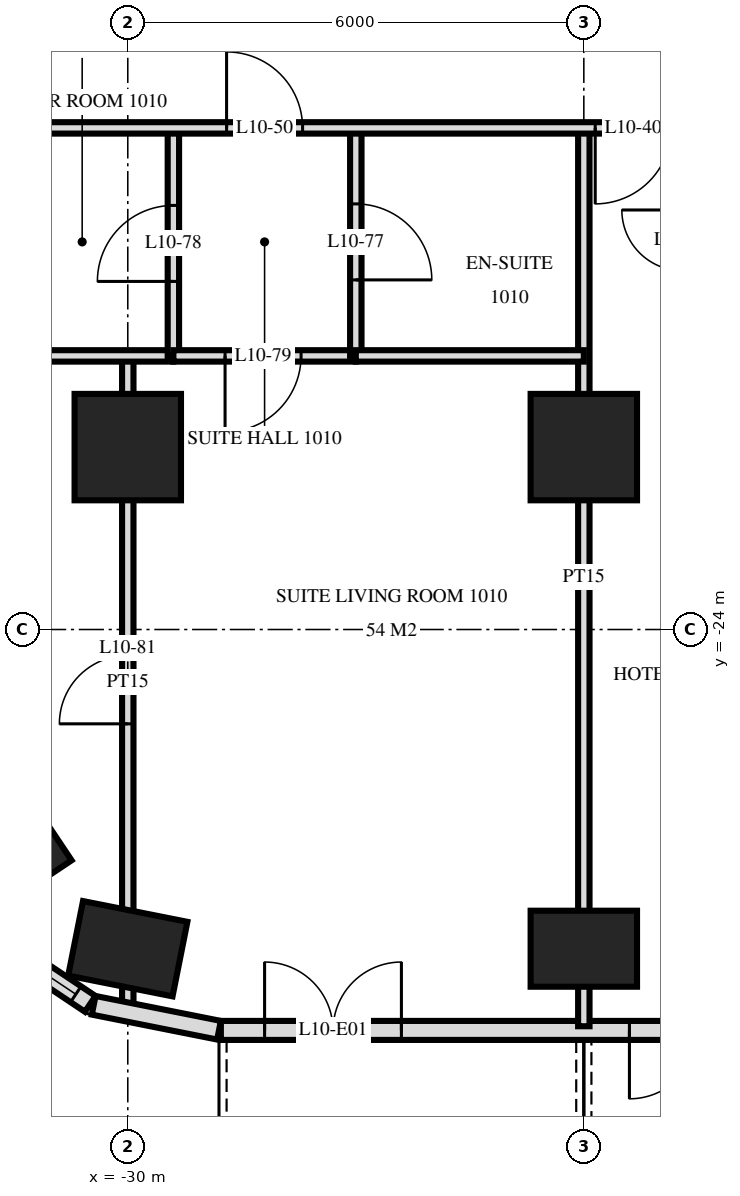
"""IFC4 building model, lengths in metres.
Left out: names, types, materials, properties, quantities, classifications, styles, units other than length and angle.
Written with IfcOpenShell. Run it as: python <this file> out.ifc"""

import sys

from ifc_helpers import new_model, si_unit, direction, frame, frame_2d, origin, origin_2d, place, context, subcontext, project, spatial, rectangle, extrude, element, fill, save


model = new_model("IFC4")
c1 = context("Model", 3, precision=1e-05, world=origin(), true_north=direction((0.0, 1.0)))
c2 = subcontext(c1, "Body", "Model", "MODEL_VIEW")
j1 = project(units=[si_unit("LENGTHUNIT", "METRE"), si_unit("PLANEANGLEUNIT", "RADIAN")], contexts=[c1])
p1 = place(None, origin())
s1 = spatial("IfcSite", under=j1, at=p1, CompositionType="ELEMENT")
p2 = place(p1, origin())
s2 = spatial("IfcBuilding", under=s1, at=p2, CompositionType="ELEMENT")
p3 = place(p2, frame((0.0, 0.0, 45.6)))
s3 = spatial("IfcBuildingStorey", under=s2, at=p3, CompositionType="ELEMENT", Elevation=45.6)
for number, where, z_axis, x_axis in (
    (1, (-31.544, -26.733, 0.0), (0.0, 0.0, 1.0), (-0.556, 0.831, 0.0)),
    (2, (-30.0, -28.2, 0.0), (0.0, 0.0, 1.0), (-0.981, 0.195, 0.0)),
):
    element("IfcColumn", number, at=place(p3, frame(where, z_axis=z_axis, x_axis=x_axis)), inside=s3, PredefinedType="COLUMN", context=c2, shape_type="SweptSolid", body=[
        extrude(rectangle(XDim=1.4, YDim=1.0, at=origin_2d()), origin(), (0.0, 0.0, 1.0), 3.6),
    ])
p4 = place(p3, frame((-30.0, -21.6, 0.0), z_axis=(0.0, 0.0, 1.0), x_axis=(1.0, 0.0, 0.0)))
e3 = element("IfcColumn", 3, at=p4, inside=s3, PredefinedType="COLUMN", context=c2, shape_type="SweptSolid", body=[
    extrude(rectangle(XDim=1.4, YDim=1.4, at=origin_2d()), origin(), (0.0, 0.0, 1.0), 3.6),
])
p5 = place(p3, frame((-24.0, -28.2, 0.0), z_axis=(0.0, 0.0, 1.0), x_axis=(1.0, 0.0, 0.0)))
e4 = element("IfcColumn", 4, at=p5, inside=s3, PredefinedType="COLUMN", context=c2, shape_type="SweptSolid", body=[
    extrude(rectangle(XDim=1.4, YDim=1.0, at=origin_2d()), origin(), (0.0, 0.0, 1.0), 3.6),
])
p6 = place(p3, frame((-24.0, -21.6, 0.0), z_axis=(0.0, 0.0, 1.0), x_axis=(1.0, 0.0, 0.0)))
e5 = element("IfcColumn", 5, at=p6, inside=s3, PredefinedType="COLUMN", context=c2, shape_type="SweptSolid", body=[
    extrude(rectangle(XDim=1.4, YDim=1.4, at=origin_2d()), origin(), (0.0, 0.0, 1.0), 3.6),
])
p7 = place(p3, frame((-31.871, -28.006, 0.0), z_axis=(0.0, 0.0, 1.0), x_axis=(0.831482937015, -0.55555029066, 0.0)))
e6 = element("IfcWall", 6, at=p7, inside=s3, PredefinedType="SOLIDWALL", context=c2, shape_type="SweptSolid", body=[
    extrude(rectangle(XDim=1.656, YDim=0.25, at=frame_2d((0.828, 0.0))), origin(), (0.0, 0.0, 1.0), 3.32),
])
p8 = place(p7, frame((0.228, 0.0, 0.9)))
e7 = element("IfcOpeningElement", 7, at=p8, cuts=e6, PredefinedType="OPENING", context=c2, shape_type="SweptSolid", body=[
    extrude(rectangle(XDim=1.2, YDim=1.5, at=frame_2d((0.6, 0.75))), frame((0.0, 0.135, 0.0), z_axis=(0.0, -1.0, 0.0), x_axis=(1.0, 0.0, 0.0)), (0.0, 0.0, 1.0), 0.27),
])
p9 = place(p3, frame((-30.449, -28.945, 0.0), z_axis=(0.0, 0.0, 1.0), x_axis=(0.980775640221, -0.19513878023, 0.0)))
e8 = element("IfcWall", 8, at=p9, inside=s3, PredefinedType="SOLIDWALL", context=c2, shape_type="SweptSolid", body=[
    extrude(rectangle(XDim=1.681, YDim=0.25, at=frame_2d((0.841, 0.0))), origin(), (0.0, 0.0, 1.0), 3.32),
])
p10 = place(p3, frame((-28.775, -29.275, 0.0), z_axis=(0.0, 0.0, 1.0), x_axis=(1.0, 0.0, 0.0)))
e9 = element("IfcWall", 9, at=p10, inside=s3, PredefinedType="SOLIDWALL", context=c2, shape_type="SweptSolid", body=[
    extrude(rectangle(XDim=57.551, YDim=0.25, at=frame_2d((28.775, 0.0))), origin(), (0.0, 0.0, 1.0), 3.32),
])
p11 = place(p10, frame((0.575, 0.0, 0.0)))
e10 = element("IfcOpeningElement", 10, at=p11, cuts=e9, PredefinedType="OPENING", context=c2, shape_type="SweptSolid", body=[
    extrude(rectangle(XDim=1.8, YDim=2.4, at=frame_2d((0.9, 1.2))), frame((0.0, 0.135, 0.0), z_axis=(0.0, -1.0, 0.0), x_axis=(1.0, 0.0, 0.0)), (0.0, 0.0, 1.0), 0.27),
])
p12 = place(p10, frame((5.375, 0.0, 0.0)))
e11 = element("IfcOpeningElement", 11, at=p12, cuts=e9, PredefinedType="OPENING", context=c2, shape_type="SweptSolid", body=[
    extrude(rectangle(XDim=1.8, YDim=2.4, at=frame_2d((0.9, 1.2))), frame((0.0, 0.135, 0.0), z_axis=(0.0, -1.0, 0.0), x_axis=(1.0, 0.0, 0.0)), (0.0, 0.0, 1.0), 0.27),
])
p13 = place(p10, frame((8.075, 0.0, 0.3)))
e12 = element("IfcOpeningElement", 12, at=p13, cuts=e9, PredefinedType="OPENING", context=c2, shape_type="SweptSolid", body=[
    extrude(rectangle(XDim=2.4, YDim=2.1, at=frame_2d((1.2, 1.05))), frame((0.0, 0.135, 0.0), z_axis=(0.0, -1.0, 0.0), x_axis=(1.0, 0.0, 0.0)), (0.0, 0.0, 1.0), 0.27),
])
p14 = place(p10, frame((12.875, 0.0, 0.0)))
e13 = element("IfcOpeningElement", 13, at=p14, cuts=e9, PredefinedType="OPENING", context=c2, shape_type="SweptSolid", body=[
    extrude(rectangle(XDim=1.8, YDim=2.4, at=frame_2d((0.9, 1.2))), frame((0.0, 0.135, 0.0), z_axis=(0.0, -1.0, 0.0), x_axis=(1.0, 0.0, 0.0)), (0.0, 0.0, 1.0), 0.27),
])
p15 = place(p10, frame((17.375, 0.0, 0.0)))
e14 = element("IfcOpeningElement", 14, at=p15, cuts=e9, PredefinedType="OPENING", context=c2, shape_type="SweptSolid", body=[
    extrude(rectangle(XDim=1.8, YDim=2.4, at=frame_2d((0.9, 1.2))), frame((0.0, 0.135, 0.0), z_axis=(0.0, -1.0, 0.0), x_axis=(1.0, 0.0, 0.0)), (0.0, 0.0, 1.0), 0.27),
])
p16 = place(p10, frame((20.075, 0.0, 0.3)))
e15 = element("IfcOpeningElement", 15, at=p16, cuts=e9, PredefinedType="OPENING", context=c2, shape_type="SweptSolid", body=[
    extrude(rectangle(XDim=2.4, YDim=2.1, at=frame_2d((1.2, 1.05))), frame((0.0, 0.135, 0.0), z_axis=(0.0, -1.0, 0.0), x_axis=(1.0, 0.0, 0.0)), (0.0, 0.0, 1.0), 0.27),
])
p17 = place(p10, frame((23.075, 0.0, 0.3)))
e16 = element("IfcOpeningElement", 16, at=p17, cuts=e9, PredefinedType="OPENING", context=c2, shape_type="SweptSolid", body=[
    extrude(rectangle(XDim=2.4, YDim=2.1, at=frame_2d((1.2, 1.05))), frame((0.0, 0.135, 0.0), z_axis=(0.0, -1.0, 0.0), x_axis=(1.0, 0.0, 0.0)), (0.0, 0.0, 1.0), 0.27),
])
p18 = place(p10, frame((26.375, 0.0, 0.0)))
e17 = element("IfcOpeningElement", 17, at=p18, cuts=e9, PredefinedType="OPENING", context=c2, shape_type="SweptSolid", body=[
    extrude(rectangle(XDim=1.8, YDim=2.4, at=frame_2d((0.9, 1.2))), frame((0.0, 0.135, 0.0), z_axis=(0.0, -1.0, 0.0), x_axis=(1.0, 0.0, 0.0)), (0.0, 0.0, 1.0), 0.27),
])
p19 = place(p10, frame((29.075, 0.0, 0.3)))
e18 = element("IfcOpeningElement", 18, at=p19, cuts=e9, PredefinedType="OPENING", context=c2, shape_type="SweptSolid", body=[
    extrude(rectangle(XDim=2.4, YDim=2.1, at=frame_2d((1.2, 1.05))), frame((0.0, 0.135, 0.0), z_axis=(0.0, -1.0, 0.0), x_axis=(1.0, 0.0, 0.0)), (0.0, 0.0, 1.0), 0.27),
])
p20 = place(p10, frame((32.375, 0.0, 0.0)))
e19 = element("IfcOpeningElement", 19, at=p20, cuts=e9, PredefinedType="OPENING", context=c2, shape_type="SweptSolid", body=[
    extrude(rectangle(XDim=1.8, YDim=2.4, at=frame_2d((0.9, 1.2))), frame((0.0, 0.135, 0.0), z_axis=(0.0, -1.0, 0.0), x_axis=(1.0, 0.0, 0.0)), (0.0, 0.0, 1.0), 0.27),
])
p21 = place(p10, frame((35.375, 0.0, 0.0)))
e20 = element("IfcOpeningElement", 20, at=p21, cuts=e9, PredefinedType="OPENING", context=c2, shape_type="SweptSolid", body=[
    extrude(rectangle(XDim=1.8, YDim=2.4, at=frame_2d((0.9, 1.2))), frame((0.0, 0.135, 0.0), z_axis=(0.0, -1.0, 0.0), x_axis=(1.0, 0.0, 0.0)), (0.0, 0.0, 1.0), 0.27),
])
p22 = place(p10, frame((38.075, 0.0, 0.3)))
e21 = element("IfcOpeningElement", 21, at=p22, cuts=e9, PredefinedType="OPENING", context=c2, shape_type="SweptSolid", body=[
    extrude(rectangle(XDim=2.4, YDim=2.1, at=frame_2d((1.2, 1.05))), frame((0.0, 0.135, 0.0), z_axis=(0.0, -1.0, 0.0), x_axis=(1.0, 0.0, 0.0)), (0.0, 0.0, 1.0), 0.27),
])
p23 = place(p10, frame((41.075, 0.0, 0.3)))
e22 = element("IfcOpeningElement", 22, at=p23, cuts=e9, PredefinedType="OPENING", context=c2, shape_type="SweptSolid", body=[
    extrude(rectangle(XDim=2.4, YDim=2.1, at=frame_2d((1.2, 1.05))), frame((0.0, 0.135, 0.0), z_axis=(0.0, -1.0, 0.0), x_axis=(1.0, 0.0, 0.0)), (0.0, 0.0, 1.0), 0.27),
])
p24 = place(p10, frame((44.375, 0.0, 0.0)))
e23 = element("IfcOpeningElement", 23, at=p24, cuts=e9, PredefinedType="OPENING", context=c2, shape_type="SweptSolid", body=[
    extrude(rectangle(XDim=1.8, YDim=2.4, at=frame_2d((0.9, 1.2))), frame((0.0, 0.135, 0.0), z_axis=(0.0, -1.0, 0.0), x_axis=(1.0, 0.0, 0.0)), (0.0, 0.0, 1.0), 0.27),
])
p25 = place(p10, frame((47.075, 0.0, 0.3)))
e24 = element("IfcOpeningElement", 24, at=p25, cuts=e9, PredefinedType="OPENING", context=c2, shape_type="SweptSolid", body=[
    extrude(rectangle(XDim=2.4, YDim=2.1, at=frame_2d((1.2, 1.05))), frame((0.0, 0.135, 0.0), z_axis=(0.0, -1.0, 0.0), x_axis=(1.0, 0.0, 0.0)), (0.0, 0.0, 1.0), 0.27),
])
p26 = place(p10, frame((50.375, 0.0, 0.0)))
e25 = element("IfcOpeningElement", 25, at=p26, cuts=e9, PredefinedType="OPENING", context=c2, shape_type="SweptSolid", body=[
    extrude(rectangle(XDim=1.8, YDim=2.4, at=frame_2d((0.9, 1.2))), frame((0.0, 0.135, 0.0), z_axis=(0.0, -1.0, 0.0), x_axis=(1.0, 0.0, 0.0)), (0.0, 0.0, 1.0), 0.27),
])
p27 = place(p10, frame((53.375, 0.0, 0.0)))
e26 = element("IfcOpeningElement", 26, at=p27, cuts=e9, PredefinedType="OPENING", context=c2, shape_type="SweptSolid", body=[
    extrude(rectangle(XDim=1.8, YDim=2.4, at=frame_2d((0.9, 1.2))), frame((0.0, 0.135, 0.0), z_axis=(0.0, -1.0, 0.0), x_axis=(1.0, 0.0, 0.0)), (0.0, 0.0, 1.0), 0.27),
])
p28 = place(p3, frame((-24.0, -29.22, 0.0), z_axis=(0.0, 0.0, 1.0), x_axis=(0.0, 1.0, 0.0)))
e27 = element("IfcWall", 27, at=p28, inside=s3, PredefinedType="PARTITIONING", context=c2, shape_type="SweptSolid", body=[
    extrude(rectangle(XDim=11.82, YDim=0.15, at=frame_2d((5.91, 0.0))), origin(), (0.0, 0.0, 1.0), 3.32),
])
p29 = place(p3, frame((-27.0, -20.4, 0.0), z_axis=(0.0, 0.0, 1.0), x_axis=(0.0, 1.0, 0.0)))
e28 = element("IfcWall", 28, at=p29, inside=s3, PredefinedType="PARTITIONING", context=c2, shape_type="SweptSolid", body=[
    extrude(rectangle(XDim=3.0, YDim=0.15, at=frame_2d((1.5, 0.0))), origin(), (0.0, 0.0, 1.0), 3.32),
])
p30 = place(p29, frame((1.0, 0.0, 0.0)))
e29 = element("IfcOpeningElement", 29, at=p30, cuts=e28, PredefinedType="OPENING", context=c2, shape_type="SweptSolid", body=[
    extrude(rectangle(XDim=1.0, YDim=2.1, at=frame_2d((0.5, 1.05))), frame((0.0, 0.085, 0.0), z_axis=(0.0, -1.0, 0.0), x_axis=(1.0, 0.0, 0.0)), (0.0, 0.0, 1.0), 0.17),
])
p31 = place(p3, frame((-29.4, -20.4, 0.0), z_axis=(0.0, 0.0, 1.0), x_axis=(0.0, 1.0, 0.0)))
e30 = element("IfcWall", 30, at=p31, inside=s3, PredefinedType="PARTITIONING", context=c2, shape_type="SweptSolid", body=[
    extrude(rectangle(XDim=3.0, YDim=0.15, at=frame_2d((1.5, 0.0))), origin(), (0.0, 0.0, 1.0), 3.32),
])
p32 = place(p31, frame((0.98, 0.0, 0.0)))
e31 = element("IfcOpeningElement", 31, at=p32, cuts=e30, PredefinedType="OPENING", context=c2, shape_type="SweptSolid", body=[
    extrude(rectangle(XDim=1.0, YDim=2.1, at=frame_2d((0.5, 1.05))), frame((0.0, 0.085, 0.0), z_axis=(0.0, -1.0, 0.0), x_axis=(1.0, 0.0, 0.0)), (0.0, 0.0, 1.0), 0.17),
])
p33 = place(p3, frame((-30.0, -28.978, 0.0), z_axis=(0.0, 0.0, 1.0), x_axis=(0.0, 1.0, 0.0)))
e32 = element("IfcWall", 32, at=p33, inside=s3, PredefinedType="PARTITIONING", context=c2, shape_type="SweptSolid", body=[
    extrude(rectangle(XDim=8.578, YDim=0.15, at=frame_2d((4.289, 0.0))), origin(), (0.0, 0.0, 1.0), 3.32),
])
p34 = place(p33, frame((3.737, 0.0, 0.0)))
e33 = element("IfcOpeningElement", 33, at=p34, cuts=e32, PredefinedType="OPENING", context=c2, shape_type="SweptSolid", body=[
    extrude(rectangle(XDim=0.9, YDim=2.1, at=frame_2d((0.45, 1.05))), frame((0.0, 0.085, 0.0), z_axis=(0.0, -1.0, 0.0), x_axis=(1.0, 0.0, 0.0)), (0.0, 0.0, 1.0), 0.17),
])
p35 = place(p3, frame((-29.4, -20.4, 0.0), z_axis=(0.0, 0.0, 1.0), x_axis=(1.0, 0.0, 0.0)))
e34 = element("IfcWall", 34, at=p35, inside=s3, PredefinedType="PARTITIONING", context=c2, shape_type="SweptSolid", body=[
    extrude(rectangle(XDim=2.4, YDim=0.15, at=frame_2d((1.2, 0.0))), origin(), (0.0, 0.0, 1.0), 3.32),
])
p36 = place(p35, frame((0.68, 0.0, 0.0)))
e35 = element("IfcOpeningElement", 35, at=p36, cuts=e34, PredefinedType="OPENING", context=c2, shape_type="SweptSolid", body=[
    extrude(rectangle(XDim=1.0, YDim=2.1, at=frame_2d((0.5, 1.05))), frame((0.0, 0.085, 0.0), z_axis=(0.0, -1.0, 0.0), x_axis=(1.0, 0.0, 0.0)), (0.0, 0.0, 1.0), 0.17),
])
p37 = place(p3, frame((-31.8, -20.4, 0.0), z_axis=(0.0, 0.0, 1.0), x_axis=(1.0, 0.0, 0.0)))
e36 = element("IfcWall", 36, at=p37, inside=s3, PredefinedType="PARTITIONING", context=c2, shape_type="SweptSolid", body=[
    extrude(rectangle(XDim=2.4, YDim=0.15, at=frame_2d((1.2, 0.0))), origin(), (0.0, 0.0, 1.0), 3.32),
])
p38 = place(p3, frame((-27.0, -20.4, 0.0), z_axis=(0.0, 0.0, 1.0), x_axis=(1.0, 0.0, 0.0)))
e37 = element("IfcWall", 37, at=p38, inside=s3, PredefinedType="PARTITIONING", context=c2, shape_type="SweptSolid", body=[
    extrude(rectangle(XDim=3.0, YDim=0.15, at=frame_2d((1.5, 0.0))), origin(), (0.0, 0.0, 1.0), 3.32),
])
p39 = place(p3, frame((-33.12, -17.4, 0.0), z_axis=(0.0, 0.0, 1.0), x_axis=(1.0, 0.0, 0.0)))
e38 = element("IfcWall", 38, at=p39, inside=s3, PredefinedType="PARTITIONING", context=c2, shape_type="SweptSolid", body=[
    extrude(rectangle(XDim=66.24, YDim=0.15, at=frame_2d((33.12, 0.0))), origin(), (0.0, 0.0, 1.0), 3.32),
])
p40 = place(p39, frame((9.27, 0.0, 0.0)))
e39 = element("IfcOpeningElement", 39, at=p40, cuts=e38, PredefinedType="OPENING", context=c2, shape_type="SweptSolid", body=[
    extrude(rectangle(XDim=1.0, YDim=2.1, at=frame_2d((0.5, 1.05))), frame((0.0, 0.085, 0.0), z_axis=(0.0, -1.0, 0.0), x_axis=(1.0, 0.0, 0.0)), (0.0, 0.0, 1.0), 0.17),
])
p41 = place(p39, frame((13.97, 0.0, 0.0)))
e40 = element("IfcOpeningElement", 40, at=p41, cuts=e38, PredefinedType="OPENING", context=c2, shape_type="SweptSolid", body=[
    extrude(rectangle(XDim=1.0, YDim=2.1, at=frame_2d((0.5, 1.05))), frame((0.0, 0.085, 0.0), z_axis=(0.0, -1.0, 0.0), x_axis=(1.0, 0.0, 0.0)), (0.0, 0.0, 1.0), 0.17),
])
p42 = place(p39, frame((17.62, 0.0, 0.0)))
e41 = element("IfcOpeningElement", 41, at=p42, cuts=e38, PredefinedType="OPENING", context=c2, shape_type="SweptSolid", body=[
    extrude(rectangle(XDim=1.0, YDim=2.1, at=frame_2d((0.5, 1.05))), frame((0.0, 0.085, 0.0), z_axis=(0.0, -1.0, 0.0), x_axis=(1.0, 0.0, 0.0)), (0.0, 0.0, 1.0), 0.17),
])
p43 = place(p39, frame((21.27, 0.0, 0.0)))
e42 = element("IfcOpeningElement", 42, at=p43, cuts=e38, PredefinedType="OPENING", context=c2, shape_type="SweptSolid", body=[
    extrude(rectangle(XDim=1.0, YDim=2.1, at=frame_2d((0.5, 1.05))), frame((0.0, 0.085, 0.0), z_axis=(0.0, -1.0, 0.0), x_axis=(1.0, 0.0, 0.0)), (0.0, 0.0, 1.0), 0.17),
])
p44 = place(p39, frame((25.97, 0.0, 0.0)))
e43 = element("IfcOpeningElement", 43, at=p44, cuts=e38, PredefinedType="OPENING", context=c2, shape_type="SweptSolid", body=[
    extrude(rectangle(XDim=1.0, YDim=2.1, at=frame_2d((0.5, 1.05))), frame((0.0, 0.085, 0.0), z_axis=(0.0, -1.0, 0.0), x_axis=(1.0, 0.0, 0.0)), (0.0, 0.0, 1.0), 0.17),
])
p45 = place(p39, frame((35.62, 0.0, 0.0)))
e44 = element("IfcOpeningElement", 44, at=p45, cuts=e38, PredefinedType="OPENING", context=c2, shape_type="SweptSolid", body=[
    extrude(rectangle(XDim=1.0, YDim=2.1, at=frame_2d((0.5, 1.05))), frame((0.0, 0.085, 0.0), z_axis=(0.0, -1.0, 0.0), x_axis=(1.0, 0.0, 0.0)), (0.0, 0.0, 1.0), 0.17),
])
p46 = place(p39, frame((40.97, 0.0, 0.0)))
e45 = element("IfcOpeningElement", 45, at=p46, cuts=e38, PredefinedType="OPENING", context=c2, shape_type="SweptSolid", body=[
    extrude(rectangle(XDim=1.0, YDim=2.1, at=frame_2d((0.5, 1.05))), frame((0.0, 0.085, 0.0), z_axis=(0.0, -1.0, 0.0), x_axis=(1.0, 0.0, 0.0)), (0.0, 0.0, 1.0), 0.17),
])
p47 = place(p39, frame((42.27, 0.0, 0.0)))
e46 = element("IfcOpeningElement", 46, at=p47, cuts=e38, PredefinedType="OPENING", context=c2, shape_type="SweptSolid", body=[
    extrude(rectangle(XDim=1.0, YDim=2.1, at=frame_2d((0.5, 1.05))), frame((0.0, 0.085, 0.0), z_axis=(0.0, -1.0, 0.0), x_axis=(1.0, 0.0, 0.0)), (0.0, 0.0, 1.0), 0.17),
])
p48 = place(p39, frame((49.72, 0.0, 0.0)))
e47 = element("IfcOpeningElement", 47, at=p48, cuts=e38, PredefinedType="OPENING", context=c2, shape_type="SweptSolid", body=[
    extrude(rectangle(XDim=1.0, YDim=2.1, at=frame_2d((0.5, 1.05))), frame((0.0, 0.085, 0.0), z_axis=(0.0, -1.0, 0.0), x_axis=(1.0, 0.0, 0.0)), (0.0, 0.0, 1.0), 0.17),
])
p49 = place(p39, frame((51.27, 0.0, 0.0)))
e48 = element("IfcOpeningElement", 48, at=p49, cuts=e38, PredefinedType="OPENING", context=c2, shape_type="SweptSolid", body=[
    extrude(rectangle(XDim=1.0, YDim=2.1, at=frame_2d((0.5, 1.05))), frame((0.0, 0.085, 0.0), z_axis=(0.0, -1.0, 0.0), x_axis=(1.0, 0.0, 0.0)), (0.0, 0.0, 1.0), 0.17),
])
p50 = place(p39, frame((4.42, 0.0, 0.0)))
e49 = element("IfcOpeningElement", 49, at=p50, cuts=e38, PredefinedType="OPENING", context=c2, shape_type="SweptSolid", body=[
    extrude(rectangle(XDim=1.0, YDim=2.1, at=frame_2d((0.5, 1.05))), frame((0.0, 0.085, 0.0), z_axis=(0.0, -1.0, 0.0), x_axis=(1.0, 0.0, 0.0)), (0.0, 0.0, 1.0), 0.17),
])
p51 = place(p39, frame((54.82, 0.0, 0.0)))
e50 = element("IfcOpeningElement", 50, at=p51, cuts=e38, PredefinedType="OPENING", context=c2, shape_type="SweptSolid", body=[
    extrude(rectangle(XDim=1.0, YDim=2.1, at=frame_2d((0.5, 1.05))), frame((0.0, 0.085, 0.0), z_axis=(0.0, -1.0, 0.0), x_axis=(1.0, 0.0, 0.0)), (0.0, 0.0, 1.0), 0.17),
])
p52 = place(p8, origin())
e51 = element("IfcWindow", 51, at=p52, inside=s3, PartitioningType="SINGLE_PANEL", PredefinedType="WINDOW", context=c2, shape_type="SweptSolid", body=[
    extrude(rectangle(XDim=1.2, YDim=1.5, at=frame_2d((0.6, 0.75))), frame((0.0, 0.03, 0.0), z_axis=(0.0, -1.0, 0.0), x_axis=(1.0, 0.0, 0.0)), (0.0, 0.0, 1.0), 0.06),
])
fill(e7, e51)
p53 = place(p11, origin())
e52 = element("IfcDoor", 52, at=p53, inside=s3, OperationType="DOUBLE_DOOR_SINGLE_SWING", PredefinedType="DOOR", context=c2, shape_type="SweptSolid", body=[
    extrude(rectangle(XDim=1.8, YDim=2.4, at=frame_2d((0.9, 1.2))), frame((0.0, 0.025, 0.0), z_axis=(0.0, -1.0, 0.0), x_axis=(1.0, 0.0, 0.0)), (0.0, 0.0, 1.0), 0.05),
])
fill(e10, e52)
p54 = place(p12, frame((0.9, 0.0, 0.0), z_axis=(0.0, 0.0, 1.0), x_axis=(-1.0, 0.0, 0.0)))
e53 = element("IfcDoor", 53, at=p54, inside=s3, OperationType="DOUBLE_DOOR_SINGLE_SWING", PredefinedType="DOOR", context=c2, shape_type="SweptSolid", body=[
    extrude(rectangle(XDim=1.8, YDim=2.4, at=frame_2d((0.0, 1.2))), frame((0.0, -0.025, 0.0), z_axis=(0.0, 1.0, 0.0), x_axis=(-1.0, 0.0, 0.0)), (0.0, 0.0, 1.0), 0.05),
])
fill(e11, e53)
p55 = place(p40, frame((0.5, 0.0, 0.0), z_axis=(0.0, 0.0, 1.0), x_axis=(-1.0, 0.0, 0.0)))
e54 = element("IfcDoor", 54, at=p55, inside=s3, OperationType="SINGLE_SWING_LEFT", PredefinedType="DOOR", context=c2, shape_type="SweptSolid", body=[
    extrude(rectangle(XDim=1.0, YDim=2.1, at=frame_2d((0.0, 1.05))), frame((0.0, -0.025, 0.0), z_axis=(0.0, 1.0, 0.0), x_axis=(-1.0, 0.0, 0.0)), (0.0, 0.0, 1.0), 0.05),
])
fill(e39, e54)
p56 = place(p50, origin())
e55 = element("IfcDoor", 55, at=p56, inside=s3, OperationType="SINGLE_SWING_RIGHT", PredefinedType="DOOR", context=c2, shape_type="SweptSolid", body=[
    extrude(rectangle(XDim=1.0, YDim=2.1, at=frame_2d((0.5, 1.05))), frame((0.0, 0.025, 0.0), z_axis=(0.0, -1.0, 0.0), x_axis=(1.0, 0.0, 0.0)), (0.0, 0.0, 1.0), 0.05),
])
fill(e49, e55)
p57 = place(p30, frame((0.5, 0.0, 0.0), z_axis=(0.0, 0.0, 1.0), x_axis=(-1.0, 0.0, 0.0)))
e56 = element("IfcDoor", 56, at=p57, inside=s3, OperationType="SINGLE_SWING_LEFT", PredefinedType="DOOR", context=c2, shape_type="SweptSolid", body=[
    extrude(rectangle(XDim=1.0, YDim=2.1, at=frame_2d((0.0, 1.05))), frame((0.0, -0.025, 0.0), z_axis=(0.0, 1.0, 0.0), x_axis=(-1.0, 0.0, 0.0)), (0.0, 0.0, 1.0), 0.05),
])
fill(e29, e56)
p58 = place(p32, origin())
e57 = element("IfcDoor", 57, at=p58, inside=s3, OperationType="SINGLE_SWING_RIGHT", PredefinedType="DOOR", context=c2, shape_type="SweptSolid", body=[
    extrude(rectangle(XDim=1.0, YDim=2.1, at=frame_2d((0.5, 1.05))), frame((0.0, 0.025, 0.0), z_axis=(0.0, -1.0, 0.0), x_axis=(1.0, 0.0, 0.0)), (0.0, 0.0, 1.0), 0.05),
])
fill(e31, e57)
p59 = place(p36, frame((0.5, 0.0, 0.0), z_axis=(0.0, 0.0, 1.0), x_axis=(-1.0, 0.0, 0.0)))
e58 = element("IfcDoor", 58, at=p59, inside=s3, OperationType="SINGLE_SWING_LEFT", PredefinedType="DOOR", context=c2, shape_type="SweptSolid", body=[
    extrude(rectangle(XDim=1.0, YDim=2.1, at=frame_2d((0.0, 1.05))), frame((0.0, -0.025, 0.0), z_axis=(0.0, 1.0, 0.0), x_axis=(-1.0, 0.0, 0.0)), (0.0, 0.0, 1.0), 0.05),
])
fill(e35, e58)
p60 = place(p34, origin())
e59 = element("IfcDoor", 59, at=p60, inside=s3, OperationType="SINGLE_SWING_RIGHT", PredefinedType="DOOR", context=c2, shape_type="SweptSolid", body=[
    extrude(rectangle(XDim=0.9, YDim=2.1, at=frame_2d((0.45, 1.05))), frame((0.0, 0.025, 0.0), z_axis=(0.0, -1.0, 0.0), x_axis=(1.0, 0.0, 0.0)), (0.0, 0.0, 1.0), 0.05),
])
fill(e33, e59)
save(model, sys.argv[1])
